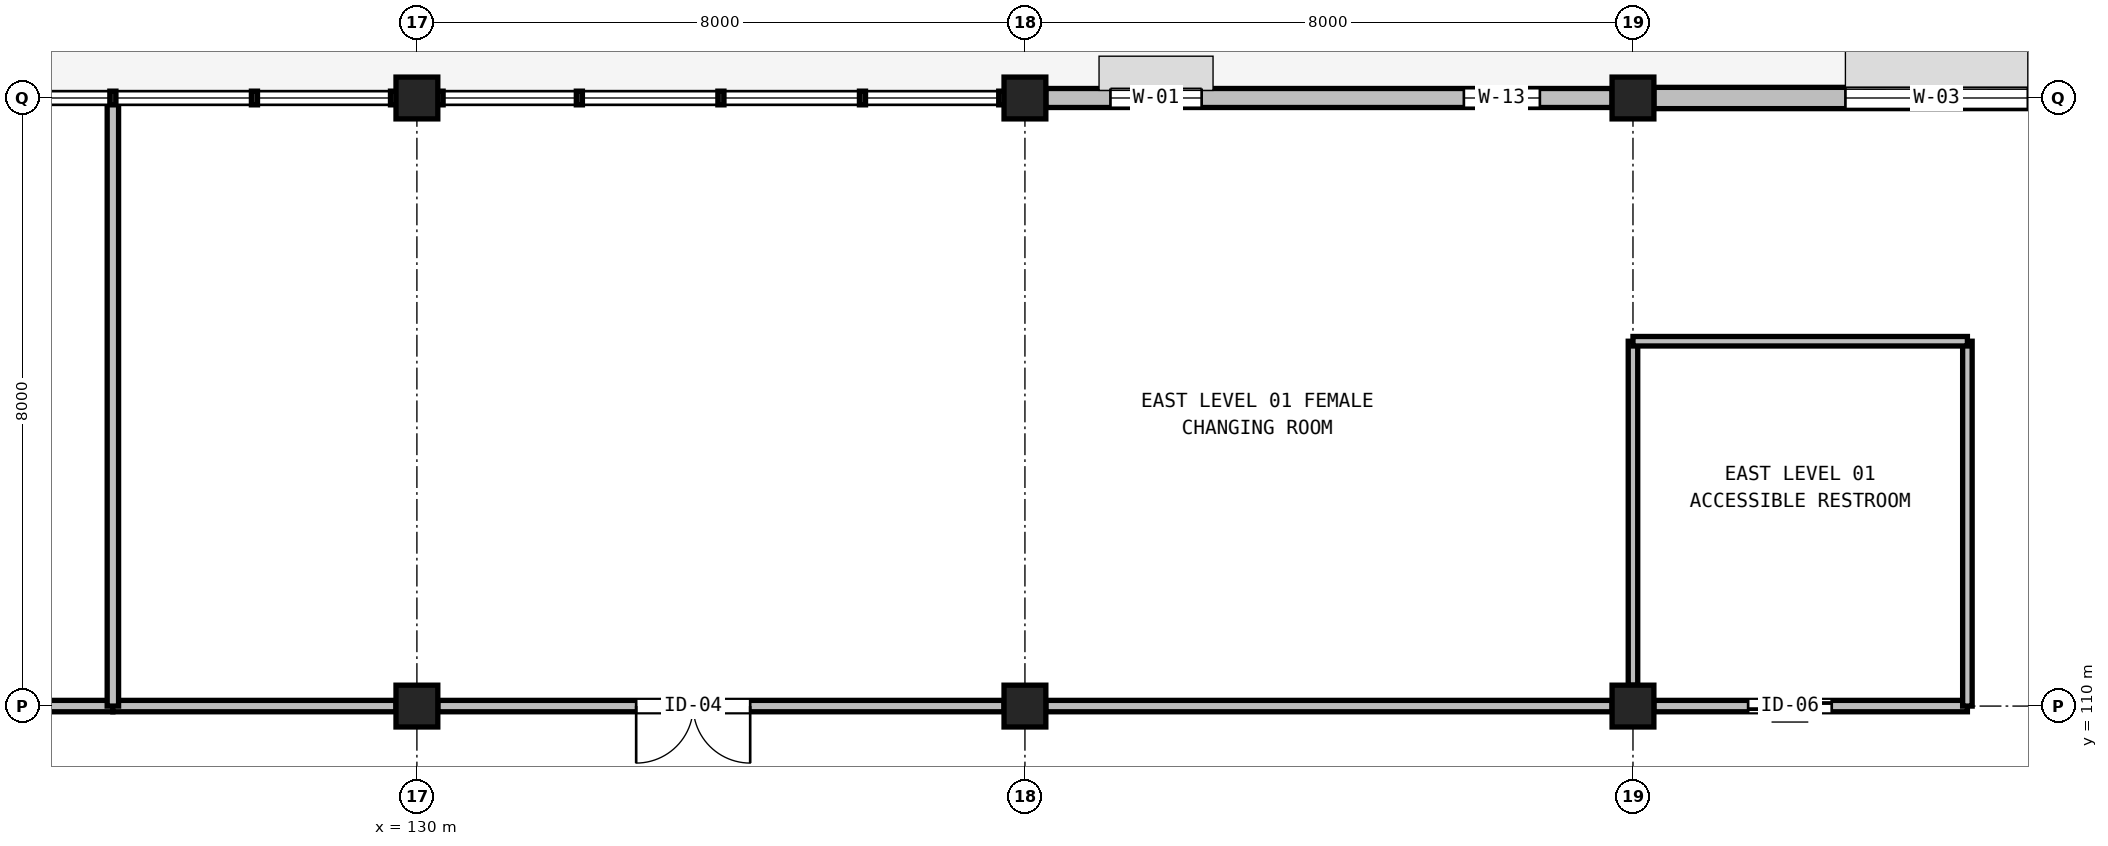
"""IFC4 building model, lengths in metres.
Left out: names, types, materials, properties, quantities, classifications, styles, units other than length and angle.
Written with IfcOpenShell. Run it as: python <this file> out.ifc"""

import sys

from ifc_helpers import new_model, si_unit, direction, frame, frame_2d, origin, origin_2d, place, context, subcontext, project, spatial, rectangle, circle, extrude, element, fill, save


model = new_model("IFC4")
c1 = context("Model", 3, precision=1e-05, world=origin(), true_north=direction((0.0, 1.0)))
c2 = subcontext(c1, "Body", "Model", "MODEL_VIEW")
j1 = project(units=[si_unit("LENGTHUNIT", "METRE"), si_unit("PLANEANGLEUNIT", "RADIAN")], contexts=[c1])
p1 = place(None, origin())
s1 = spatial("IfcSite", under=j1, at=p1, CompositionType="ELEMENT")
p2 = place(p1, origin())
s2 = spatial("IfcBuilding", under=s1, at=p2, CompositionType="ELEMENT")
p3 = place(p2, frame((0.0, 0.0, 5.4)))
s3 = spatial("IfcBuildingStorey", under=s2, at=p3, CompositionType="ELEMENT", Elevation=5.4)
for number, where, z_axis, x_axis in (
    (1, (130.0, 110.0, 0.0), (0.0, 0.0, 1.0), (1.0, 0.0, 0.0)),
    (2, (130.0, 118.0, 0.0), (0.0, 0.0, 1.0), (1.0, 0.0, 0.0)),
    (3, (138.0, 110.0, 0.0), (0.0, 0.0, 1.0), (1.0, 0.0, 0.0)),
    (4, (138.0, 118.0, 0.0), (0.0, 0.0, 1.0), (1.0, 0.0, 0.0)),
    (5, (146.0, 110.0, 0.0), (0.0, 0.0, 1.0), (1.0, 0.0, 0.0)),
    (6, (146.0, 118.0, 0.0), (0.0, 0.0, 1.0), (1.0, 0.0, 0.0)),
):
    element("IfcColumn", number, at=place(p3, frame(where, z_axis=z_axis, x_axis=x_axis)), inside=s3, PredefinedType="COLUMN", context=c2, shape_type="SweptSolid", body=[
        extrude(circle(Radius=0.275, at=origin_2d()), origin(), (0.0, 0.0, 1.0), 5.4),
    ])
p4 = place(p3, frame((138.275, 118.0, 0.0), z_axis=(0.0, 0.0, 1.0), x_axis=(1.0, 0.0, 0.0)))
e7 = element("IfcWall", 7, at=p4, inside=s3, PredefinedType="SOLIDWALL", context=c2, shape_type="SweptSolid", body=[
    extrude(rectangle(XDim=7.45, YDim=0.25, at=frame_2d((3.725, 0.0))), origin(), (0.0, 0.0, 1.0), 4.59),
])
p5 = place(p4, frame((0.85, 0.0, 0.9)))
e8 = element("IfcOpeningElement", 8, at=p5, cuts=e7, PredefinedType="OPENING", context=c2, shape_type="SweptSolid", body=[
    extrude(rectangle(XDim=1.2, YDim=1.8, at=frame_2d((0.6, 0.9))), frame((0.0, 0.135, 0.0), z_axis=(0.0, -1.0, 0.0), x_axis=(1.0, 0.0, 0.0)), (0.0, 0.0, 1.0), 0.27),
])
p6 = place(p4, frame((5.5, 0.0, 0.9)))
e9 = element("IfcOpeningElement", 9, at=p6, cuts=e7, PredefinedType="OPENING", context=c2, shape_type="SweptSolid", body=[
    extrude(rectangle(XDim=1.0, YDim=2.1, at=frame_2d((0.5, 1.05))), frame((0.0, 0.135, 0.0), z_axis=(0.0, -1.0, 0.0), x_axis=(1.0, 0.0, 0.0)), (0.0, 0.0, 1.0), 0.27),
])
p7 = place(p3, frame((146.275, 118.0, 0.0), z_axis=(0.0, 0.0, 1.0), x_axis=(1.0, 0.0, 0.0)))
e10 = element("IfcWall", 10, at=p7, inside=s3, PredefinedType="SOLIDWALL", context=c2, shape_type="SweptSolid", body=[
    extrude(rectangle(XDim=7.45, YDim=0.28, at=frame_2d((3.725, 0.0))), origin(), (0.0, 0.0, 1.0), 4.49),
])
p8 = place(p7, frame((2.52, 0.0, 0.9)))
e11 = element("IfcOpeningElement", 11, at=p8, cuts=e10, PredefinedType="OPENING", context=c2, shape_type="SweptSolid", body=[
    extrude(rectangle(XDim=2.4, YDim=1.8, at=frame_2d((1.2, 0.9))), frame((0.0, 0.15, 0.0), z_axis=(0.0, -1.0, 0.0), x_axis=(1.0, 0.0, 0.0)), (0.0, 0.0, 1.0), 0.3),
])
for number, where, z_axis, x_axis in (
    (12, (122.275, 110.0, 0.0), (0.0, 0.0, 1.0), (1.0, 0.0, 0.0)),
    (13, (126.0, 110.0, 0.0), (0.0, 0.0, 1.0), (1.0, 0.0, 0.0)),
):
    element("IfcWall", number, at=place(p3, frame(where, z_axis=z_axis, x_axis=x_axis)), inside=s3, PredefinedType="PARTITIONING", context=c2, shape_type="SweptSolid", body=[
        extrude(rectangle(XDim=3.725, YDim=0.15, at=frame_2d((1.863, 0.0))), origin(), (0.0, 0.0, 1.0), 4.44),
    ])
p9 = place(p3, frame((130.275, 110.0, 0.0), z_axis=(0.0, 0.0, 1.0), x_axis=(1.0, 0.0, 0.0)))
e14 = element("IfcWall", 14, at=p9, inside=s3, PredefinedType="PARTITIONING", context=c2, shape_type="SweptSolid", body=[
    extrude(rectangle(XDim=7.45, YDim=0.15, at=frame_2d((3.725, 0.0))), origin(), (0.0, 0.0, 1.0), 4.34),
])
p10 = place(p9, frame((2.61, 0.0, 0.0)))
e15 = element("IfcOpeningElement", 15, at=p10, cuts=e14, PredefinedType="OPENING", context=c2, shape_type="SweptSolid", body=[
    extrude(rectangle(XDim=1.5, YDim=2.2, at=frame_2d((0.75, 1.1))), frame((0.0, 0.085, 0.0), z_axis=(0.0, -1.0, 0.0), x_axis=(1.0, 0.0, 0.0)), (0.0, 0.0, 1.0), 0.17),
])
p11 = place(p3, frame((138.275, 110.0, 0.0), z_axis=(0.0, 0.0, 1.0), x_axis=(1.0, 0.0, 0.0)))
e16 = element("IfcWall", 16, at=p11, inside=s3, PredefinedType="PARTITIONING", context=c2, shape_type="SweptSolid", body=[
    extrude(rectangle(XDim=7.45, YDim=0.15, at=frame_2d((3.725, 0.0))), origin(), (0.0, 0.0, 1.0), 4.29),
])
p12 = place(p3, frame((146.275, 110.0, 0.0), z_axis=(0.0, 0.0, 1.0), x_axis=(1.0, 0.0, 0.0)))
e17 = element("IfcWall", 17, at=p12, inside=s3, PredefinedType="PARTITIONING", context=c2, shape_type="SweptSolid", body=[
    extrude(rectangle(XDim=4.125, YDim=0.15, at=frame_2d((2.062, 0.0))), origin(), (0.0, 0.0, 1.0), 4.24),
])
p13 = place(p12, frame((1.24, 0.0, 0.0)))
e18 = element("IfcOpeningElement", 18, at=p13, cuts=e17, PredefinedType="OPENING", context=c2, shape_type="SweptSolid", body=[
    extrude(rectangle(XDim=1.1, YDim=2.15, at=frame_2d((0.55, 1.075))), frame((0.0, 0.085, 0.0), z_axis=(0.0, -1.0, 0.0), x_axis=(1.0, 0.0, 0.0)), (0.0, 0.0, 1.0), 0.17),
])
p14 = place(p3, frame((126.0, 110.0, 0.0), z_axis=(0.0, 0.0, 1.0), x_axis=(0.0, 1.0, 0.0)))
e19 = element("IfcWall", 19, at=p14, inside=s3, PredefinedType="PARTITIONING", context=c2, shape_type="SweptSolid", body=[
    extrude(rectangle(XDim=8.0, YDim=0.15, at=frame_2d((4.0, 0.0))), origin(), (0.0, 0.0, 1.0), 5.1),
])
p15 = place(p3, frame((146.0, 110.275, 0.0), z_axis=(0.0, 0.0, 1.0), x_axis=(0.0, 1.0, 0.0)))
e20 = element("IfcWall", 20, at=p15, inside=s3, PredefinedType="PARTITIONING", context=c2, shape_type="SweptSolid", body=[
    extrude(rectangle(XDim=4.525, YDim=0.125, at=frame_2d((2.263, 0.0))), origin(), (0.0, 0.0, 1.0), 4.44),
])
p16 = place(p3, frame((150.4, 110.0, 0.0), z_axis=(0.0, 0.0, 1.0), x_axis=(0.0, 1.0, 0.0)))
e21 = element("IfcWall", 21, at=p16, inside=s3, PredefinedType="PARTITIONING", context=c2, shape_type="SweptSolid", body=[
    extrude(rectangle(XDim=4.8, YDim=0.125, at=frame_2d((2.4, 0.0))), origin(), (0.0, 0.0, 1.0), 5.1),
])
p17 = place(p3, frame((146.0, 114.8, 0.0), z_axis=(0.0, 0.0, 1.0), x_axis=(1.0, 0.0, 0.0)))
e22 = element("IfcWall", 22, at=p17, inside=s3, PredefinedType="PARTITIONING", context=c2, shape_type="SweptSolid", body=[
    extrude(rectangle(XDim=4.4, YDim=0.125, at=frame_2d((2.2, 0.0))), origin(), (0.0, 0.0, 1.0), 5.1),
])
p18 = place(p5, origin())
e23 = element("IfcWindow", 23, at=p18, inside=s3, PartitioningType="SINGLE_PANEL", PredefinedType="WINDOW", context=c2, shape_type="SweptSolid", body=[
    extrude(rectangle(XDim=1.2, YDim=1.8, at=frame_2d((0.6, 0.9))), frame((0.0, 0.03, 0.0), z_axis=(0.0, -1.0, 0.0), x_axis=(1.0, 0.0, 0.0)), (0.0, 0.0, 1.0), 0.06),
])
fill(e8, e23)
p19 = place(p6, origin())
e24 = element("IfcWindow", 24, at=p19, inside=s3, PartitioningType="SINGLE_PANEL", PredefinedType="WINDOW", context=c2, shape_type="SweptSolid", body=[
    extrude(rectangle(XDim=1.0, YDim=2.1, at=frame_2d((0.5, 1.05))), frame((0.0, 0.03, 0.0), z_axis=(0.0, -1.0, 0.0), x_axis=(1.0, 0.0, 0.0)), (0.0, 0.0, 1.0), 0.06),
])
fill(e9, e24)
p20 = place(p8, origin())
e25 = element("IfcWindow", 25, at=p20, inside=s3, PartitioningType="SINGLE_PANEL", PredefinedType="WINDOW", context=c2, shape_type="SweptSolid", body=[
    extrude(rectangle(XDim=2.4, YDim=1.8, at=frame_2d((1.2, 0.9))), frame((0.0, 0.03, 0.0), z_axis=(0.0, -1.0, 0.0), x_axis=(1.0, 0.0, 0.0)), (0.0, 0.0, 1.0), 0.06),
])
fill(e11, e25)
p21 = place(p10, frame((1.5, 0.0, 0.0), z_axis=(0.0, 0.0, 1.0), x_axis=(-1.0, 0.0, 0.0)))
e26 = element("IfcDoor", 26, at=p21, inside=s3, OperationType="DOUBLE_DOOR_SINGLE_SWING", PredefinedType="DOOR", context=c2, shape_type="SweptSolid", body=[
    extrude(rectangle(XDim=1.5, YDim=2.2, at=frame_2d((0.75, 1.1))), frame((0.0, 0.025, 0.0), z_axis=(0.0, -1.0, 0.0), x_axis=(1.0, 0.0, 0.0)), (0.0, 0.0, 1.0), 0.05),
])
fill(e15, e26)
p22 = place(p13, frame((1.1, 0.0, 0.0), z_axis=(0.0, 0.0, 1.0), x_axis=(-1.0, 0.0, 0.0)))
e27 = element("IfcDoor", 27, at=p22, inside=s3, OperationType="SLIDING_TO_RIGHT", PredefinedType="DOOR", context=c2, shape_type="SweptSolid", body=[
    extrude(rectangle(XDim=1.1, YDim=2.15, at=frame_2d((0.55, 1.075))), frame((0.0, 0.025, 0.0), z_axis=(0.0, -1.0, 0.0), x_axis=(1.0, 0.0, 0.0)), (0.0, 0.0, 1.0), 0.05),
])
fill(e18, e27)
save(model, sys.argv[1])
